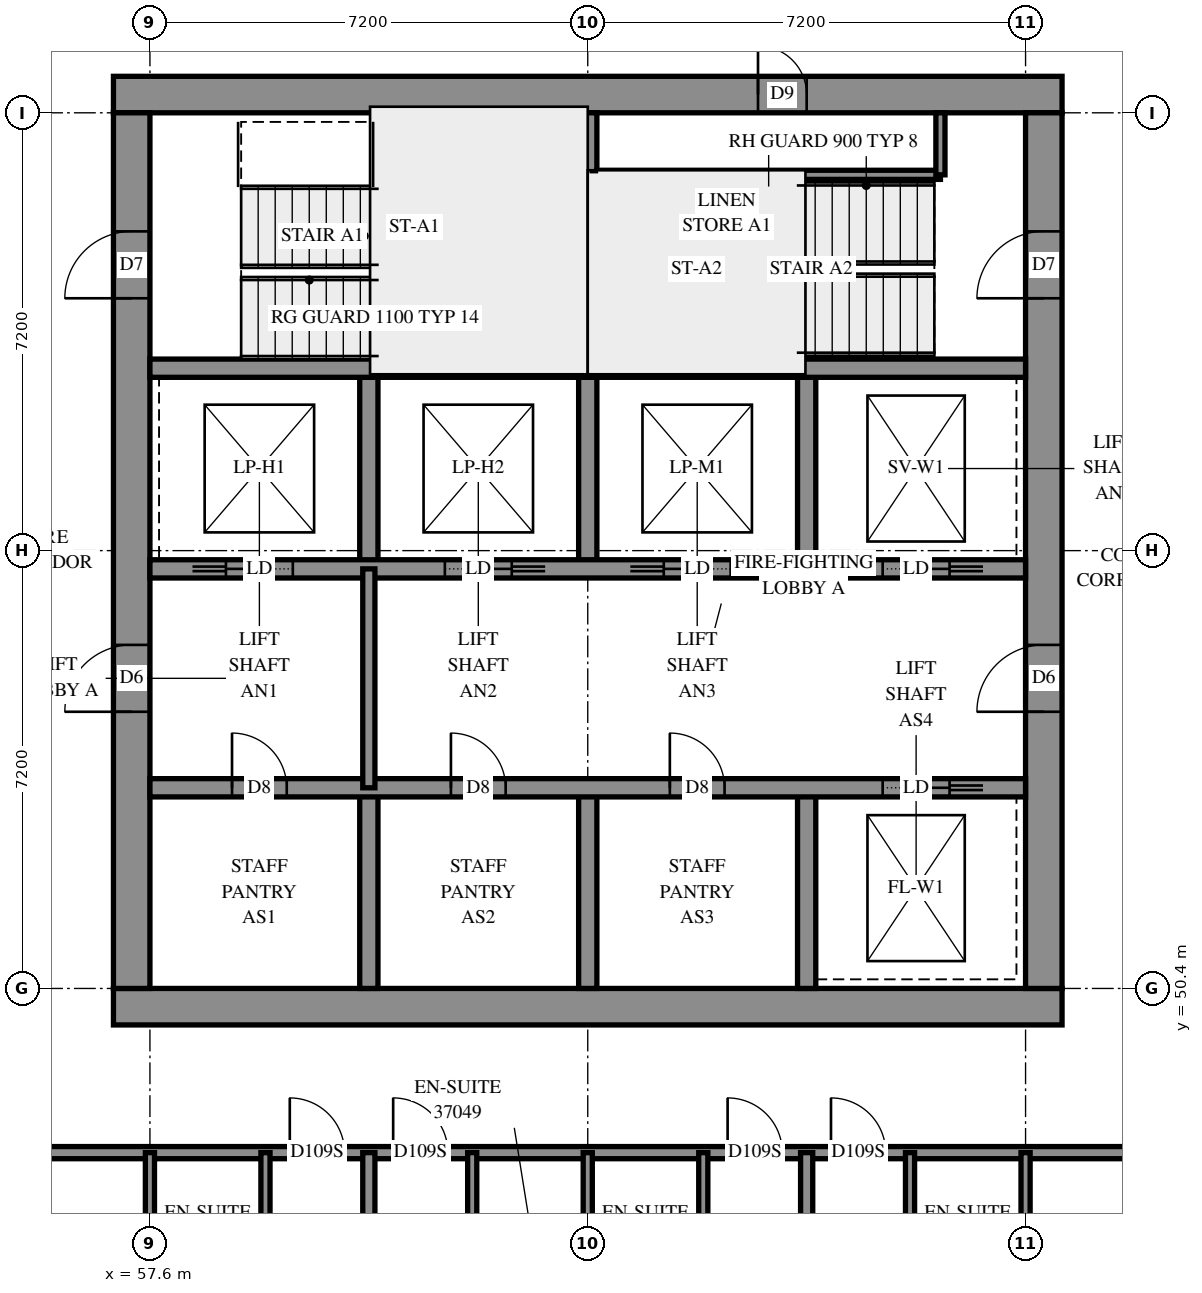
"""IFC4 building model, lengths in metres.
Left out: names, types, materials, properties, quantities, classifications, styles, units other than length and angle.
Written with IfcOpenShell. Run it as: python <this file> out.ifc"""

import sys

from ifc_helpers import new_model, si_unit, direction, frame, frame_2d, origin, place, context, subcontext, project, spatial, rectangle, extrude, element, fill, save


model = new_model("IFC4")
c1 = context("Model", 3, precision=1e-05, world=origin(), true_north=direction((0.0, 1.0)))
c2 = subcontext(c1, "Body", "Model", "MODEL_VIEW")
j1 = project(units=[si_unit("LENGTHUNIT", "METRE"), si_unit("PLANEANGLEUNIT", "RADIAN")], contexts=[c1])
p1 = place(None, origin())
s1 = spatial("IfcSite", under=j1, at=p1, CompositionType="ELEMENT")
p2 = place(p1, origin())
s2 = spatial("IfcBuilding", under=s1, at=p2, CompositionType="ELEMENT")
p3 = place(p2, frame((0.0, 0.0, 138.8)))
s3 = spatial("IfcBuildingStorey", under=s2, at=p3, CompositionType="ELEMENT", Elevation=138.8)
p4 = place(p3, frame((57.0, 50.1, -0.3), z_axis=(0.0, 0.0, 1.0), x_axis=(1.0, 0.0, 0.0)))
e1 = element("IfcWall", 1, at=p4, inside=s3, PredefinedType="SHEAR", context=c2, shape_type="SweptSolid", body=[
    extrude(rectangle(XDim=15.6, YDim=0.6, at=frame_2d((7.8, 0.0))), origin(), (0.0, 0.0, 1.0), 2.7),
])
p5 = place(p3, frame((57.0, 65.1, -0.3), z_axis=(0.0, 0.0, 1.0), x_axis=(1.0, 0.0, 0.0)))
e2 = element("IfcWall", 2, at=p5, inside=s3, PredefinedType="SHEAR", context=c2, shape_type="SweptSolid", body=[
    extrude(rectangle(XDim=15.6, YDim=0.6, at=frame_2d((7.8, 0.0))), origin(), (0.0, 0.0, 1.0), 2.7),
])
p6 = place(p5, frame((10.6, 0.0, 0.3)))
e3 = element("IfcOpeningElement", 3, at=p6, cuts=e2, PredefinedType="OPENING", context=c2, shape_type="SweptSolid", body=[
    extrude(rectangle(XDim=0.8, YDim=2.1, at=frame_2d((0.4, 1.05))), frame((0.0, 0.31, 0.0), z_axis=(0.0, -1.0, 0.0), x_axis=(1.0, 0.0, 0.0)), (0.0, 0.0, 1.0), 0.62),
])
p7 = place(p3, frame((57.3, 50.4, -0.3), z_axis=(0.0, 0.0, 1.0), x_axis=(0.0, 1.0, 0.0)))
e4 = element("IfcWall", 4, at=p7, inside=s3, PredefinedType="SHEAR", context=c2, shape_type="SweptSolid", body=[
    extrude(rectangle(XDim=14.4, YDim=0.6, at=frame_2d((7.2, 0.0))), origin(), (0.0, 0.0, 1.0), 2.7),
])
p8 = place(p7, frame((4.55, 0.0, 0.3)))
e5 = element("IfcOpeningElement", 5, at=p8, cuts=e4, PredefinedType="OPENING", context=c2, shape_type="SweptSolid", body=[
    extrude(rectangle(XDim=1.1, YDim=2.1, at=frame_2d((0.55, 1.05))), frame((0.0, 0.31, 0.0), z_axis=(0.0, -1.0, 0.0), x_axis=(1.0, 0.0, 0.0)), (0.0, 0.0, 1.0), 0.62),
])
p9 = place(p7, frame((11.35, 0.0, 0.3)))
e6 = element("IfcOpeningElement", 6, at=p9, cuts=e4, PredefinedType="OPENING", context=c2, shape_type="SweptSolid", body=[
    extrude(rectangle(XDim=1.1, YDim=2.1, at=frame_2d((0.55, 1.05))), frame((0.0, 0.31, 0.0), z_axis=(0.0, -1.0, 0.0), x_axis=(1.0, 0.0, 0.0)), (0.0, 0.0, 1.0), 0.62),
])
p10 = place(p3, frame((72.3, 50.4, -0.3), z_axis=(0.0, 0.0, 1.0), x_axis=(0.0, 1.0, 0.0)))
e7 = element("IfcWall", 7, at=p10, inside=s3, PredefinedType="SHEAR", context=c2, shape_type="SweptSolid", body=[
    extrude(rectangle(XDim=14.4, YDim=0.6, at=frame_2d((7.2, 0.0))), origin(), (0.0, 0.0, 1.0), 2.7),
])
p11 = place(p10, frame((4.55, 0.0, 0.3)))
e8 = element("IfcOpeningElement", 8, at=p11, cuts=e7, PredefinedType="OPENING", context=c2, shape_type="SweptSolid", body=[
    extrude(rectangle(XDim=1.1, YDim=2.1, at=frame_2d((0.55, 1.05))), frame((0.0, 0.31, 0.0), z_axis=(0.0, -1.0, 0.0), x_axis=(1.0, 0.0, 0.0)), (0.0, 0.0, 1.0), 0.62),
])
p12 = place(p10, frame((11.35, 0.0, 0.3)))
e9 = element("IfcOpeningElement", 9, at=p12, cuts=e7, PredefinedType="OPENING", context=c2, shape_type="SweptSolid", body=[
    extrude(rectangle(XDim=1.1, YDim=2.1, at=frame_2d((0.55, 1.05))), frame((0.0, 0.31, 0.0), z_axis=(0.0, -1.0, 0.0), x_axis=(1.0, 0.0, 0.0)), (0.0, 0.0, 1.0), 0.62),
])
for number, where, z_axis, x_axis in (
    (10, (61.2, 50.4, 0.0), (0.0, 0.0, 1.0), (0.0, 1.0, 0.0)),
    (11, (61.2, 57.3, 0.0), (0.0, 0.0, 1.0), (0.0, 1.0, 0.0)),
    (12, (64.8, 50.4, 0.0), (0.0, 0.0, 1.0), (0.0, 1.0, 0.0)),
    (13, (64.8, 57.3, 0.0), (0.0, 0.0, 1.0), (0.0, 1.0, 0.0)),
    (14, (68.4, 50.4, 0.0), (0.0, 0.0, 1.0), (0.0, 1.0, 0.0)),
    (15, (68.4, 57.3, 0.0), (0.0, 0.0, 1.0), (0.0, 1.0, 0.0)),
):
    element("IfcWall", number, at=place(p3, frame(where, z_axis=z_axis, x_axis=x_axis)), inside=s3, PredefinedType="SOLIDWALL", context=c2, shape_type="SweptSolid", body=[
        extrude(rectangle(XDim=3.3, YDim=0.3, at=frame_2d((1.65, 0.0))), origin(), (0.0, 0.0, 1.0), 3.1),
    ])
p13 = place(p3, frame((57.6, 53.7, 0.0), z_axis=(0.0, 0.0, 1.0), x_axis=(1.0, 0.0, 0.0)))
e16 = element("IfcWall", 16, at=p13, inside=s3, PredefinedType="SOLIDWALL", context=c2, shape_type="SweptSolid", body=[
    extrude(rectangle(XDim=14.4, YDim=0.3, at=frame_2d((7.2, 0.0))), origin(), (0.0, 0.0, 1.0), 3.1),
])
p14 = place(p13, frame((1.35, 0.0, 0.0)))
e17 = element("IfcOpeningElement", 17, at=p14, cuts=e16, PredefinedType="OPENING", context=c2, shape_type="SweptSolid", body=[
    extrude(rectangle(XDim=0.9, YDim=2.1, at=frame_2d((0.45, 1.05))), frame((0.0, 0.16, 0.0), z_axis=(0.0, -1.0, 0.0), x_axis=(1.0, 0.0, 0.0)), (0.0, 0.0, 1.0), 0.32),
])
p15 = place(p13, frame((4.95, 0.0, 0.0)))
e18 = element("IfcOpeningElement", 18, at=p15, cuts=e16, PredefinedType="OPENING", context=c2, shape_type="SweptSolid", body=[
    extrude(rectangle(XDim=0.9, YDim=2.1, at=frame_2d((0.45, 1.05))), frame((0.0, 0.16, 0.0), z_axis=(0.0, -1.0, 0.0), x_axis=(1.0, 0.0, 0.0)), (0.0, 0.0, 1.0), 0.32),
])
p16 = place(p13, frame((8.55, 0.0, 0.0)))
e19 = element("IfcOpeningElement", 19, at=p16, cuts=e16, PredefinedType="OPENING", context=c2, shape_type="SweptSolid", body=[
    extrude(rectangle(XDim=0.9, YDim=2.1, at=frame_2d((0.45, 1.05))), frame((0.0, 0.16, 0.0), z_axis=(0.0, -1.0, 0.0), x_axis=(1.0, 0.0, 0.0)), (0.0, 0.0, 1.0), 0.32),
])
p17 = place(p13, frame((12.05, 0.0, 0.0)))
e20 = element("IfcOpeningElement", 20, at=p17, cuts=e16, PredefinedType="OPENING", context=c2, shape_type="SweptSolid", body=[
    extrude(rectangle(XDim=1.1, YDim=2.1, at=frame_2d((0.55, 1.05))), frame((0.0, 0.16, 0.0), z_axis=(0.0, -1.0, 0.0), x_axis=(1.0, 0.0, 0.0)), (0.0, 0.0, 1.0), 0.32),
])
p18 = place(p3, frame((57.6, 57.3, 0.0), z_axis=(0.0, 0.0, 1.0), x_axis=(1.0, 0.0, 0.0)))
e21 = element("IfcWall", 21, at=p18, inside=s3, PredefinedType="SOLIDWALL", context=c2, shape_type="SweptSolid", body=[
    extrude(rectangle(XDim=14.4, YDim=0.3, at=frame_2d((7.2, 0.0))), origin(), (0.0, 0.0, 1.0), 3.1),
])
p19 = place(p18, frame((1.25, 0.0, 0.0)))
e22 = element("IfcOpeningElement", 22, at=p19, cuts=e21, PredefinedType="OPENING", context=c2, shape_type="SweptSolid", body=[
    extrude(rectangle(XDim=1.1, YDim=2.1, at=frame_2d((0.55, 1.05))), frame((0.0, 0.16, 0.0), z_axis=(0.0, -1.0, 0.0), x_axis=(1.0, 0.0, 0.0)), (0.0, 0.0, 1.0), 0.32),
])
p20 = place(p18, frame((4.85, 0.0, 0.0)))
e23 = element("IfcOpeningElement", 23, at=p20, cuts=e21, PredefinedType="OPENING", context=c2, shape_type="SweptSolid", body=[
    extrude(rectangle(XDim=1.1, YDim=2.1, at=frame_2d((0.55, 1.05))), frame((0.0, 0.16, 0.0), z_axis=(0.0, -1.0, 0.0), x_axis=(1.0, 0.0, 0.0)), (0.0, 0.0, 1.0), 0.32),
])
p21 = place(p18, frame((8.45, 0.0, 0.0)))
e24 = element("IfcOpeningElement", 24, at=p21, cuts=e21, PredefinedType="OPENING", context=c2, shape_type="SweptSolid", body=[
    extrude(rectangle(XDim=1.1, YDim=2.1, at=frame_2d((0.55, 1.05))), frame((0.0, 0.16, 0.0), z_axis=(0.0, -1.0, 0.0), x_axis=(1.0, 0.0, 0.0)), (0.0, 0.0, 1.0), 0.32),
])
p22 = place(p18, frame((12.05, 0.0, 0.0)))
e25 = element("IfcOpeningElement", 25, at=p22, cuts=e21, PredefinedType="OPENING", context=c2, shape_type="SweptSolid", body=[
    extrude(rectangle(XDim=1.1, YDim=2.1, at=frame_2d((0.55, 1.05))), frame((0.0, 0.16, 0.0), z_axis=(0.0, -1.0, 0.0), x_axis=(1.0, 0.0, 0.0)), (0.0, 0.0, 1.0), 0.32),
])
for number, where, z_axis, x_axis in (
    (26, (57.6, 60.6, 0.0), (0.0, 0.0, 1.0), (1.0, 0.0, 0.0)),
    (27, (64.8, 60.6, 0.0), (0.0, 0.0, 1.0), (1.0, 0.0, 0.0)),
):
    element("IfcWall", number, at=place(p3, frame(where, z_axis=z_axis, x_axis=x_axis)), inside=s3, PredefinedType="SOLIDWALL", context=c2, shape_type="SweptSolid", body=[
        extrude(rectangle(XDim=7.2, YDim=0.3, at=frame_2d((3.6, 0.0))), origin(), (0.0, 0.0, 1.0), 3.1),
    ])
p23 = place(p3, frame((64.8, 60.6, 0.0), z_axis=(0.0, 0.0, 1.0), x_axis=(0.0, 1.0, 0.0)))
e28 = element("IfcWall", 28, at=p23, inside=s3, PredefinedType="SOLIDWALL", context=c2, shape_type="SweptSolid", body=[
    extrude(rectangle(XDim=4.2, YDim=0.3, at=frame_2d((2.1, 0.0))), origin(), (0.0, 0.0, 1.0), 3.1),
])
p24 = place(p3, frame((64.95, 63.78, 0.0), z_axis=(0.0, 0.0, 1.0), x_axis=(1.0, 0.0, 0.0)))
e29 = element("IfcWall", 29, at=p24, inside=s3, PredefinedType="PARTITIONING", context=c2, shape_type="SweptSolid", body=[
    extrude(rectangle(XDim=5.65, YDim=0.15, at=frame_2d((2.825, 0.0))), origin(), (0.0, 0.0, 1.0), 3.1),
])
p25 = place(p3, frame((70.6, 63.78, 0.0), z_axis=(0.0, 0.0, 1.0), x_axis=(0.0, 1.0, 0.0)))
e30 = element("IfcWall", 30, at=p25, inside=s3, PredefinedType="PARTITIONING", context=c2, shape_type="SweptSolid", body=[
    extrude(rectangle(XDim=1.02, YDim=0.15, at=frame_2d((0.51, 0.0))), origin(), (0.0, 0.0, 1.0), 3.1),
])
p26 = place(p3, frame((61.2, 53.7, 0.0), z_axis=(0.0, 0.0, 1.0), x_axis=(0.0, 1.0, 0.0)))
e31 = element("IfcWall", 31, at=p26, inside=s3, PredefinedType="PARTITIONING", context=c2, shape_type="SweptSolid", body=[
    extrude(rectangle(XDim=3.6, YDim=0.2, at=frame_2d((1.8, 0.0))), origin(), (0.0, 0.0, 1.0), 3.1),
])
p27 = place(p3, frame((54.9, 47.7, 0.0), z_axis=(0.0, 0.0, 1.0), x_axis=(1.0, 0.0, 0.0)))
e32 = element("IfcWall", 32, at=p27, inside=s3, PredefinedType="PARTITIONING", context=c2, shape_type="SweptSolid", body=[
    extrude(rectangle(XDim=19.326, YDim=0.2, at=frame_2d((9.663, 0.0))), origin(), (0.0, 0.0, 1.0), 3.1),
])
p28 = place(p27, frame((5.0, 0.0, 0.0)))
e33 = element("IfcOpeningElement", 33, at=p28, cuts=e32, PredefinedType="OPENING", context=c2, shape_type="SweptSolid", body=[
    extrude(rectangle(XDim=0.9, YDim=2.1, at=frame_2d((0.45, 1.05))), frame((0.0, 0.11, 0.0), z_axis=(0.0, -1.0, 0.0), x_axis=(1.0, 0.0, 0.0)), (0.0, 0.0, 1.0), 0.22),
])
p29 = place(p27, frame((12.2, 0.0, 0.0)))
e34 = element("IfcOpeningElement", 34, at=p29, cuts=e32, PredefinedType="OPENING", context=c2, shape_type="SweptSolid", body=[
    extrude(rectangle(XDim=0.9, YDim=2.1, at=frame_2d((0.45, 1.05))), frame((0.0, 0.11, 0.0), z_axis=(0.0, -1.0, 0.0), x_axis=(1.0, 0.0, 0.0)), (0.0, 0.0, 1.0), 0.22),
])
p30 = place(p27, frame((6.7, 0.0, 0.0)))
e35 = element("IfcOpeningElement", 35, at=p30, cuts=e32, PredefinedType="OPENING", context=c2, shape_type="SweptSolid", body=[
    extrude(rectangle(XDim=0.9, YDim=2.1, at=frame_2d((0.45, 1.05))), frame((0.0, 0.11, 0.0), z_axis=(0.0, -1.0, 0.0), x_axis=(1.0, 0.0, 0.0)), (0.0, 0.0, 1.0), 0.22),
])
p31 = place(p27, frame((13.9, 0.0, 0.0)))
e36 = element("IfcOpeningElement", 36, at=p31, cuts=e32, PredefinedType="OPENING", context=c2, shape_type="SweptSolid", body=[
    extrude(rectangle(XDim=0.9, YDim=2.1, at=frame_2d((0.45, 1.05))), frame((0.0, 0.11, 0.0), z_axis=(0.0, -1.0, 0.0), x_axis=(1.0, 0.0, 0.0)), (0.0, 0.0, 1.0), 0.22),
])
p32 = place(p3, frame((68.4, 42.3, 0.0), z_axis=(0.0, 0.0, 1.0), x_axis=(0.0, 1.0, 0.0)))
e37 = element("IfcWall", 37, at=p32, inside=s3, PredefinedType="PARTITIONING", context=c2, shape_type="SweptSolid", body=[
    extrude(rectangle(XDim=5.4, YDim=0.2, at=frame_2d((2.7, 0.0))), origin(), (0.0, 0.0, 1.0), 3.1),
])
p33 = place(p3, frame((61.2, 42.335, 0.0), z_axis=(0.0, 0.0, 1.0), x_axis=(0.0, 1.0, 0.0)))
e38 = element("IfcWall", 38, at=p33, inside=s3, PredefinedType="PARTITIONING", context=c2, shape_type="SweptSolid", body=[
    extrude(rectangle(XDim=5.365, YDim=0.2, at=frame_2d((2.683, 0.0))), origin(), (0.0, 0.0, 1.0), 3.1),
])
for number, where, z_axis, x_axis in (
    (39, (59.5, 45.3, 0.0), (0.0, 0.0, 1.0), (0.0, 1.0, 0.0)),
    (40, (57.6, 45.3, 0.0), (0.0, 0.0, 1.0), (0.0, 1.0, 0.0)),
    (41, (62.9, 45.3, 0.0), (0.0, 0.0, 1.0), (0.0, 1.0, 0.0)),
    (42, (66.7, 45.3, 0.0), (0.0, 0.0, 1.0), (0.0, 1.0, 0.0)),
    (43, (64.8, 45.3, 0.0), (0.0, 0.0, 1.0), (0.0, 1.0, 0.0)),
    (44, (70.1, 45.3, 0.0), (0.0, 0.0, 1.0), (0.0, 1.0, 0.0)),
    (45, (72.0, 45.3, 0.0), (0.0, 0.0, 1.0), (0.0, 1.0, 0.0)),
):
    element("IfcWall", number, at=place(p3, frame(where, z_axis=z_axis, x_axis=x_axis)), inside=s3, PredefinedType="PARTITIONING", context=c2, shape_type="SweptSolid", body=[
        extrude(rectangle(XDim=2.4, YDim=0.15, at=frame_2d((1.2, 0.0))), origin(), (0.0, 0.0, 1.0), 3.1),
    ])
p34 = place(p6, origin())
e46 = element("IfcDoor", 46, at=p34, inside=s3, OperationType="SINGLE_SWING_RIGHT", PredefinedType="DOOR", context=c2, shape_type="SweptSolid", body=[
    extrude(rectangle(XDim=0.8, YDim=2.1, at=frame_2d((0.4, 1.05))), frame((0.0, 0.025, 0.0), z_axis=(0.0, -1.0, 0.0), x_axis=(1.0, 0.0, 0.0)), (0.0, 0.0, 1.0), 0.05),
])
fill(e3, e46)
p35 = place(p8, origin())
e47 = element("IfcDoor", 47, at=p35, inside=s3, OperationType="DOUBLE_DOOR_SINGLE_SWING", PredefinedType="DOOR", context=c2, shape_type="SweptSolid", body=[
    extrude(rectangle(XDim=1.1, YDim=2.1, at=frame_2d((0.55, 1.05))), frame((0.0, 0.025, 0.0), z_axis=(0.0, -1.0, 0.0), x_axis=(1.0, 0.0, 0.0)), (0.0, 0.0, 1.0), 0.05),
])
fill(e5, e47)
p36 = place(p11, origin())
e48 = element("IfcDoor", 48, at=p36, inside=s3, OperationType="DOUBLE_DOOR_SINGLE_SWING", PredefinedType="DOOR", context=c2, shape_type="SweptSolid", body=[
    extrude(rectangle(XDim=1.1, YDim=2.1, at=frame_2d((0.55, 1.05))), frame((0.0, 0.025, 0.0), z_axis=(0.0, -1.0, 0.0), x_axis=(1.0, 0.0, 0.0)), (0.0, 0.0, 1.0), 0.05),
])
fill(e8, e48)
p37 = place(p9, origin())
e49 = element("IfcDoor", 49, at=p37, inside=s3, OperationType="SINGLE_SWING_LEFT", PredefinedType="DOOR", context=c2, shape_type="SweptSolid", body=[
    extrude(rectangle(XDim=1.1, YDim=2.1, at=frame_2d((0.55, 1.05))), frame((0.0, 0.025, 0.0), z_axis=(0.0, -1.0, 0.0), x_axis=(1.0, 0.0, 0.0)), (0.0, 0.0, 1.0), 0.05),
])
fill(e6, e49)
p38 = place(p12, origin())
e50 = element("IfcDoor", 50, at=p38, inside=s3, OperationType="SINGLE_SWING_RIGHT", PredefinedType="DOOR", context=c2, shape_type="SweptSolid", body=[
    extrude(rectangle(XDim=1.1, YDim=2.1, at=frame_2d((0.55, 1.05))), frame((0.0, 0.025, 0.0), z_axis=(0.0, -1.0, 0.0), x_axis=(1.0, 0.0, 0.0)), (0.0, 0.0, 1.0), 0.05),
])
fill(e9, e50)
p39 = place(p14, origin())
e51 = element("IfcDoor", 51, at=p39, inside=s3, OperationType="SINGLE_SWING_LEFT", PredefinedType="DOOR", context=c2, shape_type="SweptSolid", body=[
    extrude(rectangle(XDim=0.9, YDim=2.1, at=frame_2d((0.45, 1.05))), frame((0.0, 0.025, 0.0), z_axis=(0.0, -1.0, 0.0), x_axis=(1.0, 0.0, 0.0)), (0.0, 0.0, 1.0), 0.05),
])
fill(e17, e51)
p40 = place(p15, origin())
e52 = element("IfcDoor", 52, at=p40, inside=s3, OperationType="SINGLE_SWING_LEFT", PredefinedType="DOOR", context=c2, shape_type="SweptSolid", body=[
    extrude(rectangle(XDim=0.9, YDim=2.1, at=frame_2d((0.45, 1.05))), frame((0.0, 0.025, 0.0), z_axis=(0.0, -1.0, 0.0), x_axis=(1.0, 0.0, 0.0)), (0.0, 0.0, 1.0), 0.05),
])
fill(e18, e52)
p41 = place(p16, origin())
e53 = element("IfcDoor", 53, at=p41, inside=s3, OperationType="SINGLE_SWING_LEFT", PredefinedType="DOOR", context=c2, shape_type="SweptSolid", body=[
    extrude(rectangle(XDim=0.9, YDim=2.1, at=frame_2d((0.45, 1.05))), frame((0.0, 0.025, 0.0), z_axis=(0.0, -1.0, 0.0), x_axis=(1.0, 0.0, 0.0)), (0.0, 0.0, 1.0), 0.05),
])
fill(e19, e53)
p42 = place(p17, origin())
e54 = element("IfcDoor", 54, at=p42, inside=s3, OperationType="SLIDING_TO_RIGHT", PredefinedType="DOOR", context=c2, shape_type="SweptSolid", body=[
    extrude(rectangle(XDim=1.1, YDim=2.1, at=frame_2d((0.55, 1.05))), frame((0.0, 0.025, 0.0), z_axis=(0.0, -1.0, 0.0), x_axis=(1.0, 0.0, 0.0)), (0.0, 0.0, 1.0), 0.05),
])
fill(e20, e54)
p43 = place(p19, origin())
e55 = element("IfcDoor", 55, at=p43, inside=s3, OperationType="SLIDING_TO_LEFT", PredefinedType="DOOR", context=c2, shape_type="SweptSolid", body=[
    extrude(rectangle(XDim=1.1, YDim=2.1, at=frame_2d((0.55, 1.05))), frame((0.0, 0.025, 0.0), z_axis=(0.0, -1.0, 0.0), x_axis=(1.0, 0.0, 0.0)), (0.0, 0.0, 1.0), 0.05),
])
fill(e22, e55)
p44 = place(p20, origin())
e56 = element("IfcDoor", 56, at=p44, inside=s3, OperationType="SLIDING_TO_RIGHT", PredefinedType="DOOR", context=c2, shape_type="SweptSolid", body=[
    extrude(rectangle(XDim=1.1, YDim=2.1, at=frame_2d((0.55, 1.05))), frame((0.0, 0.025, 0.0), z_axis=(0.0, -1.0, 0.0), x_axis=(1.0, 0.0, 0.0)), (0.0, 0.0, 1.0), 0.05),
])
fill(e23, e56)
p45 = place(p21, origin())
e57 = element("IfcDoor", 57, at=p45, inside=s3, OperationType="SLIDING_TO_LEFT", PredefinedType="DOOR", context=c2, shape_type="SweptSolid", body=[
    extrude(rectangle(XDim=1.1, YDim=2.1, at=frame_2d((0.55, 1.05))), frame((0.0, 0.025, 0.0), z_axis=(0.0, -1.0, 0.0), x_axis=(1.0, 0.0, 0.0)), (0.0, 0.0, 1.0), 0.05),
])
fill(e24, e57)
p46 = place(p22, origin())
e58 = element("IfcDoor", 58, at=p46, inside=s3, OperationType="SLIDING_TO_RIGHT", PredefinedType="DOOR", context=c2, shape_type="SweptSolid", body=[
    extrude(rectangle(XDim=1.1, YDim=2.1, at=frame_2d((0.55, 1.05))), frame((0.0, 0.025, 0.0), z_axis=(0.0, -1.0, 0.0), x_axis=(1.0, 0.0, 0.0)), (0.0, 0.0, 1.0), 0.05),
])
fill(e25, e58)
p47 = place(p28, origin())
e59 = element("IfcDoor", 59, at=p47, inside=s3, OperationType="SINGLE_SWING_LEFT", PredefinedType="DOOR", context=c2, shape_type="SweptSolid", body=[
    extrude(rectangle(XDim=0.9, YDim=2.1, at=frame_2d((0.45, 1.05))), frame((0.0, 0.025, 0.0), z_axis=(0.0, -1.0, 0.0), x_axis=(1.0, 0.0, 0.0)), (0.0, 0.0, 1.0), 0.05),
])
fill(e33, e59)
p48 = place(p29, origin())
e60 = element("IfcDoor", 60, at=p48, inside=s3, OperationType="SINGLE_SWING_LEFT", PredefinedType="DOOR", context=c2, shape_type="SweptSolid", body=[
    extrude(rectangle(XDim=0.9, YDim=2.1, at=frame_2d((0.45, 1.05))), frame((0.0, 0.025, 0.0), z_axis=(0.0, -1.0, 0.0), x_axis=(1.0, 0.0, 0.0)), (0.0, 0.0, 1.0), 0.05),
])
fill(e34, e60)
p49 = place(p30, origin())
e61 = element("IfcDoor", 61, at=p49, inside=s3, OperationType="SINGLE_SWING_RIGHT", PredefinedType="DOOR", context=c2, shape_type="SweptSolid", body=[
    extrude(rectangle(XDim=0.9, YDim=2.1, at=frame_2d((0.45, 1.05))), frame((0.0, 0.025, 0.0), z_axis=(0.0, -1.0, 0.0), x_axis=(1.0, 0.0, 0.0)), (0.0, 0.0, 1.0), 0.05),
])
fill(e35, e61)
p50 = place(p31, origin())
e62 = element("IfcDoor", 62, at=p50, inside=s3, OperationType="SINGLE_SWING_RIGHT", PredefinedType="DOOR", context=c2, shape_type="SweptSolid", body=[
    extrude(rectangle(XDim=0.9, YDim=2.1, at=frame_2d((0.45, 1.05))), frame((0.0, 0.025, 0.0), z_axis=(0.0, -1.0, 0.0), x_axis=(1.0, 0.0, 0.0)), (0.0, 0.0, 1.0), 0.05),
])
fill(e36, e62)
save(model, sys.argv[1])
